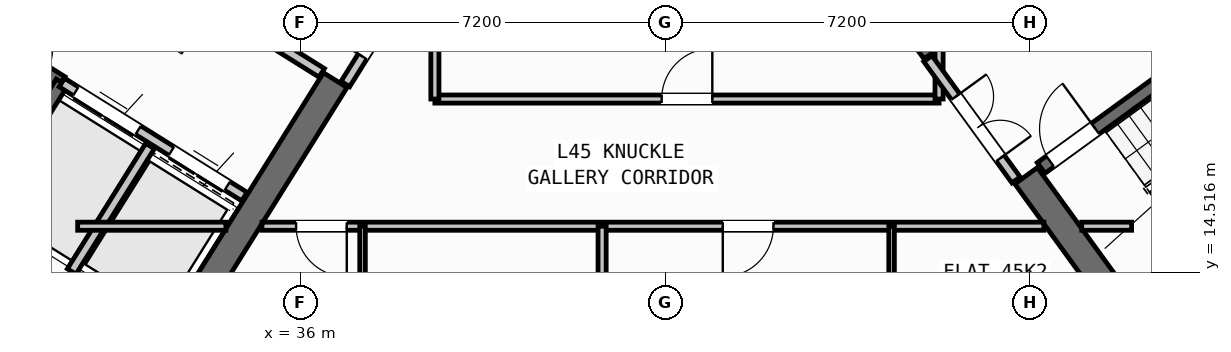
"""IFC4 building model, lengths in metres.
Left out: names, types, materials, properties, quantities, classifications, styles, units other than length and angle.
Written with IfcOpenShell. Run it as: python <this file> out.ifc"""

import sys

from ifc_helpers import new_model, si_unit, direction, frame, frame_2d, origin, place, context, subcontext, project, spatial, rectangle, extrude, source, transform, mapped, element, fill, save


model = new_model("IFC4")
c1 = context("Model", 3, precision=1e-05, world=origin(), true_north=direction((0.0, 1.0)))
c2 = subcontext(c1, "Body", "Model", "MODEL_VIEW")
j1 = project(units=[si_unit("LENGTHUNIT", "METRE"), si_unit("PLANEANGLEUNIT", "RADIAN")], contexts=[c1])
p1 = place(None, origin())
s1 = spatial("IfcSite", under=j1, at=p1, CompositionType="ELEMENT")
p2 = place(p1, origin())
s2 = spatial("IfcBuilding", under=s1, at=p2, CompositionType="ELEMENT")
p3 = place(p2, frame((0.0, 0.0, 179.4)))
s3 = spatial("IfcBuildingStorey", under=s2, at=p3, CompositionType="ELEMENT", Elevation=179.4)
p4 = place(p3, frame((33.366, 12.477, 0.0), z_axis=(0.0, 0.0, 1.0), x_axis=(-0.848047359947, 0.529920442413, 0.0)))
e1 = element("IfcWall", 1, at=p4, inside=s3, PredefinedType="SHEAR", context=c2, shape_type="SweptSolid", body=[
    extrude(rectangle(XDim=13.14, YDim=0.55, at=frame_2d((6.57, 0.0))), origin(), (0.0, 0.0, 1.0), 4.55),
])
p5 = place(p3, frame((36.683, 18.304, 0.0), z_axis=(0.0, 0.0, 1.0), x_axis=(-0.529896466841, -0.848062341122, 0.0)))
e2 = element("IfcWall", 2, at=p5, inside=s3, PredefinedType="SHEAR", context=c2, shape_type="SweptSolid", body=[
    extrude(rectangle(XDim=6.425, YDim=0.55, at=frame_2d((3.212, 0.0))), origin(), (0.0, 0.0, 1.0), 4.55),
])
p6 = place(p3, frame((52.359, 13.14, 0.0), z_axis=(0.0, 0.0, 1.0), x_axis=(0.809014896919, 0.587788139183, 0.0)))
e3 = element("IfcWall", 3, at=p6, inside=s3, PredefinedType="SHEAR", context=c2, shape_type="SweptSolid", body=[
    extrude(rectangle(XDim=12.34, YDim=0.55, at=frame_2d((6.17, 0.0))), origin(), (0.0, 0.0, 1.0), 4.55),
])
p7 = place(p3, frame((52.42, 13.524, 0.0), z_axis=(0.0, 0.0, 1.0), x_axis=(-0.587802113096, 0.809004744015, 0.0)))
e4 = element("IfcWall", 4, at=p7, inside=s3, PredefinedType="SHEAR", context=c2, shape_type="SweptSolid", body=[
    extrude(rectangle(XDim=3.575, YDim=0.55, at=frame_2d((1.788, 0.0))), origin(), (0.0, 0.0, 1.0), 4.55),
])
p8 = place(p3, frame((48.526, 18.884, 0.0), z_axis=(0.0, 0.0, 1.0), x_axis=(-0.587764933797, 0.809031756236, 0.0)))
e5 = element("IfcWall", 5, at=p8, inside=s3, PredefinedType="SHEAR", context=c2, shape_type="SweptSolid", body=[
    extrude(rectangle(XDim=6.425, YDim=0.55, at=frame_2d((3.212, 0.0))), origin(), (0.0, 0.0, 1.0), 4.55),
])
p9 = place(p3, frame((31.76, 12.183, 0.0), z_axis=(0.0, 0.0, 1.0), x_axis=(-0.848047074256, 0.529920899612, 0.0)))
e6 = element("IfcWall", 6, at=p9, inside=s3, PredefinedType="STANDARD", context=c2, shape_type="SweptSolid", body=[
    extrude(rectangle(XDim=30.652, YDim=0.32, at=frame_2d((15.326, 0.0))), origin(), (0.0, 0.0, 1.0), 4.55),
])
p10 = place(p9, frame((21.52, 0.0, 0.0)))
e7 = element("IfcOpeningElement", 7, at=p10, cuts=e6, PredefinedType="OPENING", context=c2, shape_type="SweptSolid", body=[
    extrude(rectangle(XDim=1.2, YDim=2.15, at=frame_2d((0.6, 1.075))), frame((0.0, 0.17, 0.0), z_axis=(0.0, -1.0, 0.0), x_axis=(1.0, 0.0, 0.0)), (0.0, 0.0, 1.0), 0.34),
])
p11 = place(p9, frame((14.878, 0.0, 0.0)))
e8 = element("IfcOpeningElement", 8, at=p11, cuts=e6, PredefinedType="OPENING", context=c2, shape_type="SweptSolid", body=[
    extrude(rectangle(XDim=1.5, YDim=2.25, at=frame_2d((0.75, 1.125))), frame((0.0, 0.17, 0.0), z_axis=(0.0, -1.0, 0.0), x_axis=(1.0, 0.0, 0.0)), (0.0, 0.0, 1.0), 0.34),
])
p12 = place(p9, frame((1.865, 0.0, 0.75)))
e9 = element("IfcOpeningElement", 9, at=p12, cuts=e6, PredefinedType="OPENING", context=c2, shape_type="SweptSolid", body=[
    extrude(rectangle(XDim=2.4, YDim=1.6, at=frame_2d((1.2, 0.8))), frame((0.0, 0.17, 0.0), z_axis=(0.0, -1.0, 0.0), x_axis=(1.0, 0.0, 0.0)), (0.0, 0.0, 1.0), 0.34),
])
p13 = place(p9, frame((7.094, 0.0, 0.75)))
e10 = element("IfcOpeningElement", 10, at=p13, cuts=e6, PredefinedType="OPENING", context=c2, shape_type="SweptSolid", body=[
    extrude(rectangle(XDim=2.4, YDim=1.6, at=frame_2d((1.2, 0.8))), frame((0.0, 0.17, 0.0), z_axis=(0.0, -1.0, 0.0), x_axis=(1.0, 0.0, 0.0)), (0.0, 0.0, 1.0), 0.34),
])
p14 = place(p9, frame((19.404, 0.0, 0.95)))
e11 = element("IfcOpeningElement", 11, at=p14, cuts=e6, PredefinedType="OPENING", context=c2, shape_type="SweptSolid", body=[
    extrude(rectangle(XDim=1.2, YDim=1.4, at=frame_2d((0.6, 0.7))), frame((0.0, 0.17, 0.0), z_axis=(0.0, -1.0, 0.0), x_axis=(1.0, 0.0, 0.0)), (0.0, 0.0, 1.0), 0.34),
])
p15 = place(p9, frame((26.458, 0.0, 0.75)))
e12 = element("IfcOpeningElement", 12, at=p15, cuts=e6, PredefinedType="OPENING", context=c2, shape_type="SweptSolid", body=[
    extrude(rectangle(XDim=2.4, YDim=1.6, at=frame_2d((1.2, 0.8))), frame((0.0, 0.17, 0.0), z_axis=(0.0, -1.0, 0.0), x_axis=(1.0, 0.0, 0.0)), (0.0, 0.0, 1.0), 0.34),
])
p16 = place(p3, frame((31.28, 18.261, 0.0), z_axis=(0.0, 0.0, 1.0), x_axis=(-0.848051618787, 0.529913626805, 0.0)))
e13 = element("IfcWall", 13, at=p16, inside=s3, PredefinedType="SHEAR", context=c2, shape_type="SweptSolid", body=[
    extrude(rectangle(XDim=7.46, YDim=0.26, at=frame_2d((3.73, 0.0))), origin(), (0.0, 0.0, 1.0), 4.55),
])
p17 = place(p16, frame((0.36, 0.0, 0.0)))
e14 = element("IfcOpeningElement", 14, at=p17, cuts=e13, PredefinedType="OPENING", context=c2, shape_type="SweptSolid", body=[
    extrude(rectangle(XDim=0.86, YDim=2.05, at=frame_2d((0.43, 1.025))), frame((0.0, 0.14, 0.0), z_axis=(0.0, -1.0, 0.0), x_axis=(1.0, 0.0, 0.0)), (0.0, 0.0, 1.0), 0.28),
])
p18 = place(p3, frame((31.288, 18.256, 0.0), z_axis=(0.0, 0.0, 1.0), x_axis=(-0.529943379326, -0.848033026897, 0.0)))
e15 = element("IfcWall", 15, at=p18, inside=s3, PredefinedType="SHEAR", context=c2, shape_type="SweptSolid", body=[
    extrude(rectangle(XDim=3.16, YDim=0.26, at=frame_2d((1.58, 0.0))), origin(), (0.0, 0.0, 1.0), 4.55),
])
p19 = place(p3, frame((34.891, 16.005, 0.0), z_axis=(0.0, 0.0, 1.0), x_axis=(-0.848062873452, 0.529895614884, 0.0)))
e16 = element("IfcWall", 16, at=p19, inside=s3, PredefinedType="STANDARD", context=c2, shape_type="SweptSolid", body=[
    extrude(rectangle(XDim=4.248, YDim=0.2, at=frame_2d((2.124, 0.0))), origin(), (0.0, 0.0, 1.0), 4.54),
])
p20 = place(p19, frame((0.398, 0.0, 0.0)))
e17 = element("IfcOpeningElement", 17, at=p20, cuts=e16, PredefinedType="OPENING", context=c2, shape_type="SweptSolid", body=[
    extrude(rectangle(XDim=1.3, YDim=2.2, at=frame_2d((0.65, 1.1))), frame((0.0, 0.11, 0.0), z_axis=(0.0, -1.0, 0.0), x_axis=(1.0, 0.0, 0.0)), (0.0, 0.0, 1.0), 0.22),
])
p21 = place(p19, frame((2.473, 0.0, 0.0)))
e18 = element("IfcOpeningElement", 18, at=p21, cuts=e16, PredefinedType="OPENING", context=c2, shape_type="SweptSolid", body=[
    extrude(rectangle(XDim=1.45, YDim=2.25, at=frame_2d((0.725, 1.125))), frame((0.0, 0.11, 0.0), z_axis=(0.0, -1.0, 0.0), x_axis=(1.0, 0.0, 0.0)), (0.0, 0.0, 1.0), 0.22),
])
p22 = place(p3, frame((36.417, 18.447, 0.0), z_axis=(0.0, 0.0, 1.0), x_axis=(-0.848064879198, 0.529892404805, 0.0)))
e19 = element("IfcWall", 19, at=p22, inside=s3, PredefinedType="STANDARD", context=c2, shape_type="SweptSolid", body=[
    extrude(rectangle(XDim=5.768, YDim=0.2, at=frame_2d((2.884, 0.0))), origin(), (0.0, 0.0, 1.0), 4.54),
])
p23 = place(p22, frame((2.548, 0.0, 0.0)))
e20 = element("IfcOpeningElement", 20, at=p23, cuts=e19, PredefinedType="OPENING", context=c2, shape_type="SweptSolid", body=[
    extrude(rectangle(XDim=1.15, YDim=2.1, at=frame_2d((0.575, 1.05))), frame((0.0, 0.11, 0.0), z_axis=(0.0, -1.0, 0.0), x_axis=(1.0, 0.0, 0.0)), (0.0, 0.0, 1.0), 0.22),
])
p24 = place(p3, frame((33.029, 17.003, 0.0), z_axis=(0.0, 0.0, 1.0), x_axis=(-0.529916267533, -0.848049968695, 0.0)))
e21 = element("IfcWall", 21, at=p24, inside=s3, PredefinedType="STANDARD", context=c2, shape_type="SweptSolid", body=[
    extrude(rectangle(XDim=2.92, YDim=0.2, at=frame_2d((1.46, 0.0))), origin(), (0.0, 0.0, 1.0), 4.54),
])
p25 = place(p3, frame((52.472, 14.013, 0.0), z_axis=(0.0, 0.0, 1.0), x_axis=(0.809028366311, 0.587769599847, 0.0)))
e22 = element("IfcWall", 22, at=p25, inside=s3, PredefinedType="SHEAR", context=c2, shape_type="SweptSolid", body=[
    extrude(rectangle(XDim=7.33, YDim=0.26, at=frame_2d((3.665, 0.0))), origin(), (0.0, 0.0, 1.0), 4.55),
])
p26 = place(p3, frame((50.615, 16.57, 0.0), z_axis=(0.0, 0.0, 1.0), x_axis=(0.809028366311, 0.587769599847, 0.0)))
e23 = element("IfcWall", 23, at=p26, inside=s3, PredefinedType="SHEAR", context=c2, shape_type="SweptSolid", body=[
    extrude(rectangle(XDim=7.33, YDim=0.26, at=frame_2d((3.665, 0.0))), origin(), (0.0, 0.0, 1.0), 4.55),
])
p27 = place(p26, frame((0.22, 0.0, 0.0)))
e24 = element("IfcOpeningElement", 24, at=p27, cuts=e23, PredefinedType="OPENING", context=c2, shape_type="SweptSolid", body=[
    extrude(rectangle(XDim=1.1, YDim=2.1, at=frame_2d((0.55, 1.05))), frame((0.0, 0.14, 0.0), z_axis=(0.0, -1.0, 0.0), x_axis=(1.0, 0.0, 0.0)), (0.0, 0.0, 1.0), 0.28),
])
p28 = place(p3, frame((38.451, 20.737, 0.0), z_axis=(0.0, 0.0, 1.0), x_axis=(-0.529924799939, -0.848044637038, 0.0)))
e25 = element("IfcWall", 25, at=p28, inside=s3, PredefinedType="STANDARD", context=c2, shape_type="SweptSolid", body=[
    extrude(rectangle(XDim=2.96, YDim=0.2, at=frame_2d((1.48, 0.0))), origin(), (0.0, 0.0, 1.0), 4.54),
])
p29 = place(p28, frame((1.46, 0.0, 0.0)))
e26 = element("IfcOpeningElement", 26, at=p29, cuts=e25, PredefinedType="OPENING", context=c2, shape_type="SweptSolid", body=[
    extrude(rectangle(XDim=0.86, YDim=2.05, at=frame_2d((0.43, 1.025))), frame((0.0, 0.11, 0.0), z_axis=(0.0, -1.0, 0.0), x_axis=(1.0, 0.0, 0.0)), (0.0, 0.0, 1.0), 0.22),
])
p30 = place(p3, frame((31.6, 15.42, 0.0), z_axis=(0.0, 0.0, 1.0), x_axis=(1.0, 0.0, 0.0)))
e27 = element("IfcWall", 27, at=p30, inside=s3, PredefinedType="PARTITIONING", context=c2, shape_type="SweptSolid", body=[
    extrude(rectangle(XDim=2.925, YDim=0.16, at=frame_2d((1.462, 0.0))), origin(), (0.0, 0.0, 1.0), 4.54),
])
p31 = place(p3, frame((35.237, 15.42, 0.0), z_axis=(0.0, 0.0, 1.0), x_axis=(1.0, 0.0, 0.0)))
e28 = element("IfcWall", 28, at=p31, inside=s3, PredefinedType="PARTITIONING", context=c2, shape_type="SweptSolid", body=[
    extrude(rectangle(XDim=15.432, YDim=0.16, at=frame_2d((7.716, 0.0))), origin(), (0.0, 0.0, 1.0), 4.54),
])
p32 = place(p31, frame((0.674, 0.0, 0.0)))
e29 = element("IfcOpeningElement", 29, at=p32, cuts=e28, PredefinedType="OPENING", context=c2, shape_type="SweptSolid", body=[
    extrude(rectangle(XDim=1.0, YDim=2.1, at=frame_2d((0.5, 1.05))), frame((0.0, 0.09, 0.0), z_axis=(0.0, -1.0, 0.0), x_axis=(1.0, 0.0, 0.0)), (0.0, 0.0, 1.0), 0.18),
])
p33 = place(p31, frame((9.094, 0.0, 0.0)))
e30 = element("IfcOpeningElement", 30, at=p33, cuts=e28, PredefinedType="OPENING", context=c2, shape_type="SweptSolid", body=[
    extrude(rectangle(XDim=1.0, YDim=2.1, at=frame_2d((0.5, 1.05))), frame((0.0, 0.09, 0.0), z_axis=(0.0, -1.0, 0.0), x_axis=(1.0, 0.0, 0.0)), (0.0, 0.0, 1.0), 0.18),
])
p34 = place(p3, frame((51.416, 15.42, 0.0), z_axis=(0.0, 0.0, 1.0), x_axis=(1.0, 0.0, 0.0)))
e31 = element("IfcWall", 31, at=p34, inside=s3, PredefinedType="PARTITIONING", context=c2, shape_type="SweptSolid", body=[
    extrude(rectangle(XDim=0.984, YDim=0.16, at=frame_2d((0.492, 0.0))), origin(), (0.0, 0.0, 1.0), 4.54),
])
p35 = place(p3, frame((38.65, 17.93, 0.0), z_axis=(0.0, 0.0, 1.0), x_axis=(1.0, 0.0, 0.0)))
e32 = element("IfcWall", 32, at=p35, inside=s3, PredefinedType="PARTITIONING", context=c2, shape_type="SweptSolid", body=[
    extrude(rectangle(XDim=9.95, YDim=0.16, at=frame_2d((4.975, 0.0))), origin(), (0.0, 0.0, 1.0), 4.54),
])
p36 = place(p35, frame((4.475, 0.0, 0.0)))
e33 = element("IfcOpeningElement", 33, at=p36, cuts=e32, PredefinedType="OPENING", context=c2, shape_type="SweptSolid", body=[
    extrude(rectangle(XDim=1.0, YDim=2.1, at=frame_2d((0.5, 1.05))), frame((0.0, 0.09, 0.0), z_axis=(0.0, -1.0, 0.0), x_axis=(1.0, 0.0, 0.0)), (0.0, 0.0, 1.0), 0.18),
])
p37 = place(p3, frame((38.65, 17.93, 0.0), z_axis=(0.0, 0.0, 1.0), x_axis=(0.0, 1.0, 0.0)))
e34 = element("IfcWall", 34, at=p37, inside=s3, PredefinedType="PARTITIONING", context=c2, shape_type="SweptSolid", body=[
    extrude(rectangle(XDim=2.951, YDim=0.16, at=frame_2d((1.476, 0.0))), origin(), (0.0, 0.0, 1.0), 4.54),
])
p38 = place(p3, frame((48.6, 17.93, 0.0), z_axis=(0.0, 0.0, 1.0), x_axis=(0.0, 1.0, 0.0)))
e35 = element("IfcWall", 35, at=p38, inside=s3, PredefinedType="PARTITIONING", context=c2, shape_type="SweptSolid", body=[
    extrude(rectangle(XDim=0.993, YDim=0.16, at=frame_2d((0.496, 0.0))), origin(), (0.0, 0.0, 1.0), 4.54),
])
p39 = place(p3, frame((50.119, 16.333, 0.0), z_axis=(0.0, 0.0, 1.0), x_axis=(-0.587749856981, 0.809042709391, 0.0)))
e36 = element("IfcWall", 36, at=p39, inside=s3, PredefinedType="STANDARD", context=c2, shape_type="SweptSolid", body=[
    extrude(rectangle(XDim=2.96, YDim=0.2, at=frame_2d((1.48, 0.0))), origin(), (0.0, 0.0, 1.0), 4.54),
])
p40 = place(p39, frame((0.53, 0.0, 0.0)))
e37 = element("IfcOpeningElement", 37, at=p40, cuts=e36, PredefinedType="OPENING", context=c2, shape_type="SweptSolid", body=[
    extrude(rectangle(XDim=1.5, YDim=2.15, at=frame_2d((0.75, 1.075))), frame((0.0, 0.11, 0.0), z_axis=(0.0, -1.0, 0.0), x_axis=(1.0, 0.0, 0.0)), (0.0, 0.0, 1.0), 0.22),
])
p41 = place(p3, frame((41.95, 1.96, 0.0), z_axis=(0.0, 0.0, 1.0), x_axis=(0.0, 1.0, 0.0)))
e38 = element("IfcWall", 38, at=p41, inside=s3, PredefinedType="PARTITIONING", context=c2, shape_type="SweptSolid", body=[
    extrude(rectangle(XDim=13.46, YDim=0.16, at=frame_2d((6.73, 0.0))), origin(), (0.0, 0.0, 1.0), 4.54),
])
p42 = place(p3, frame((37.222, 1.96, 0.0), z_axis=(0.0, 0.0, 1.0), x_axis=(0.0, 1.0, 0.0)))
e39 = element("IfcWall", 39, at=p42, inside=s3, PredefinedType="PARTITIONING", context=c2, shape_type="SweptSolid", body=[
    extrude(rectangle(XDim=13.46, YDim=0.11, at=frame_2d((6.73, 0.0))), origin(), (0.0, 0.0, 1.0), 4.54),
])
p43 = place(p42, frame((5.2, 0.0, 0.0)))
e40 = element("IfcOpeningElement", 40, at=p43, cuts=e39, PredefinedType="OPENING", context=c2, shape_type="SweptSolid", body=[
    extrude(rectangle(XDim=0.92, YDim=2.08, at=frame_2d((0.46, 1.04))), frame((0.0, 0.065, 0.0), z_axis=(0.0, -1.0, 0.0), x_axis=(1.0, 0.0, 0.0)), (0.0, 0.0, 1.0), 0.13),
])
p44 = place(p42, frame((10.89, 0.0, 0.0)))
e41 = element("IfcOpeningElement", 41, at=p44, cuts=e39, PredefinedType="OPENING", context=c2, shape_type="SweptSolid", body=[
    extrude(rectangle(XDim=0.88, YDim=2.08, at=frame_2d((0.44, 1.04))), frame((0.0, 0.065, 0.0), z_axis=(0.0, -1.0, 0.0), x_axis=(1.0, 0.0, 0.0)), (0.0, 0.0, 1.0), 0.13),
])
p45 = place(p3, frame((47.663, 1.96, 0.0), z_axis=(0.0, 0.0, 1.0), x_axis=(0.0, 1.0, 0.0)))
e42 = element("IfcWall", 42, at=p45, inside=s3, PredefinedType="PARTITIONING", context=c2, shape_type="SweptSolid", body=[
    extrude(rectangle(XDim=13.46, YDim=0.11, at=frame_2d((6.73, 0.0))), origin(), (0.0, 0.0, 1.0), 4.54),
])
p46 = place(p45, frame((6.3, 0.0, 0.0)))
e43 = element("IfcOpeningElement", 43, at=p46, cuts=e42, PredefinedType="OPENING", context=c2, shape_type="SweptSolid", body=[
    extrude(rectangle(XDim=0.92, YDim=2.08, at=frame_2d((0.46, 1.04))), frame((0.0, 0.065, 0.0), z_axis=(0.0, -1.0, 0.0), x_axis=(1.0, 0.0, 0.0)), (0.0, 0.0, 1.0), 0.13),
])
p47 = place(p45, frame((11.54, 0.0, 0.0)))
e44 = element("IfcOpeningElement", 44, at=p47, cuts=e42, PredefinedType="OPENING", context=c2, shape_type="SweptSolid", body=[
    extrude(rectangle(XDim=0.88, YDim=2.08, at=frame_2d((0.44, 1.04))), frame((0.0, 0.065, 0.0), z_axis=(0.0, -1.0, 0.0), x_axis=(1.0, 0.0, 0.0)), (0.0, 0.0, 1.0), 0.13),
])
m1 = source(origin(), c2, "Body", "SweptSolid", [
    extrude(rectangle(XDim=1.3, YDim=2.2, at=frame_2d((0.65, 1.1))), frame((0.0, 0.025, 0.0), z_axis=(0.0, -1.0, 0.0), x_axis=(1.0, 0.0, 0.0)), (0.0, 0.0, 1.0), 0.05),
])
p48 = place(p20, origin())
e45 = element("IfcDoor", 45, at=p48, inside=s3, OperationType="DOUBLE_DOOR_SLIDING", PredefinedType="DOOR", context=c2, shape_type="MappedRepresentation", body=[
    mapped(m1, transform((0.0, 0.0, 0.0), scale=1.0)),
])
fill(e17, e45)
m2 = source(origin(), c2, "Body", "SweptSolid", [
    extrude(rectangle(XDim=1.45, YDim=2.25, at=frame_2d((0.725, 1.125))), frame((0.0, 0.025, 0.0), z_axis=(0.0, -1.0, 0.0), x_axis=(1.0, 0.0, 0.0)), (0.0, 0.0, 1.0), 0.05),
])
p49 = place(p21, origin())
e46 = element("IfcDoor", 46, at=p49, inside=s3, OperationType="DOUBLE_DOOR_SLIDING", PredefinedType="DOOR", context=c2, shape_type="MappedRepresentation", body=[
    mapped(m2, transform((0.0, 0.0, 0.0), scale=1.0)),
])
fill(e18, e46)
m3 = source(origin(), c2, "Body", "SweptSolid", [
    extrude(rectangle(XDim=1.1, YDim=2.1, at=frame_2d((0.55, 1.05))), frame((0.0, 0.025, 0.0), z_axis=(0.0, -1.0, 0.0), x_axis=(1.0, 0.0, 0.0)), (0.0, 0.0, 1.0), 0.05),
])
p50 = place(p27, origin())
e47 = element("IfcDoor", 47, at=p50, inside=s3, OperationType="SINGLE_SWING_RIGHT", PredefinedType="DOOR", context=c2, shape_type="MappedRepresentation", body=[
    mapped(m3, transform((0.0, 0.0, 0.0), scale=1.0)),
])
fill(e24, e47)
m4 = source(origin(), c2, "Body", "SweptSolid", [
    extrude(rectangle(XDim=1.0, YDim=2.1, at=frame_2d((0.5, 1.05))), frame((0.0, 0.025, 0.0), z_axis=(0.0, -1.0, 0.0), x_axis=(1.0, 0.0, 0.0)), (0.0, 0.0, 1.0), 0.05),
])
p51 = place(p36, origin())
e48 = element("IfcDoor", 48, at=p51, inside=s3, OperationType="SINGLE_SWING_RIGHT", PredefinedType="DOOR", context=c2, shape_type="MappedRepresentation", body=[
    mapped(m4, transform((0.0, 0.0, 0.0), scale=1.0)),
])
fill(e33, e48)
m5 = source(origin(), c2, "Body", "SweptSolid", [
    extrude(rectangle(XDim=0.86, YDim=2.05, at=frame_2d((0.43, 1.025))), frame((0.0, 0.025, 0.0), z_axis=(0.0, -1.0, 0.0), x_axis=(1.0, 0.0, 0.0)), (0.0, 0.0, 1.0), 0.05),
])
p52 = place(p29, frame((0.86, 0.0, 0.0), z_axis=(0.0, 0.0, 1.0), x_axis=(-1.0, 0.0, 0.0)))
e49 = element("IfcDoor", 49, at=p52, inside=s3, OperationType="SINGLE_SWING_LEFT", PredefinedType="DOOR", context=c2, shape_type="MappedRepresentation", body=[
    mapped(m5, transform((0.0, 0.0, 0.0), scale=1.0)),
])
fill(e26, e49)
m6 = source(origin(), c2, "Body", "SweptSolid", [
    extrude(rectangle(XDim=1.5, YDim=2.15, at=frame_2d((0.75, 1.075))), frame((0.0, 0.025, 0.0), z_axis=(0.0, -1.0, 0.0), x_axis=(1.0, 0.0, 0.0)), (0.0, 0.0, 1.0), 0.05),
])
p53 = place(p40, frame((1.5, 0.0, 0.0), z_axis=(0.0, 0.0, 1.0), x_axis=(-1.0, 0.0, 0.0)))
e50 = element("IfcDoor", 50, at=p53, inside=s3, OperationType="DOUBLE_DOOR_SINGLE_SWING", PredefinedType="DOOR", context=c2, shape_type="MappedRepresentation", body=[
    mapped(m6, transform((0.0, 0.0, 0.0), scale=1.0)),
])
fill(e37, e50)
p54 = place(p32, frame((1.0, 0.0, 0.0), z_axis=(0.0, 0.0, 1.0), x_axis=(-1.0, 0.0, 0.0)))
e51 = element("IfcDoor", 51, at=p54, inside=s3, OperationType="SINGLE_SWING_LEFT", PredefinedType="DOOR", context=c2, shape_type="MappedRepresentation", body=[
    mapped(m4, transform((0.0, 0.0, 0.0), scale=1.0)),
])
fill(e29, e51)
p55 = place(p33, frame((1.0, 0.0, 0.0), z_axis=(0.0, 0.0, 1.0), x_axis=(-1.0, 0.0, 0.0)))
e52 = element("IfcDoor", 52, at=p55, inside=s3, OperationType="SINGLE_SWING_RIGHT", PredefinedType="DOOR", context=c2, shape_type="MappedRepresentation", body=[
    mapped(m4, transform((0.0, 0.0, 0.0), scale=1.0)),
])
fill(e30, e52)
save(model, sys.argv[1])
